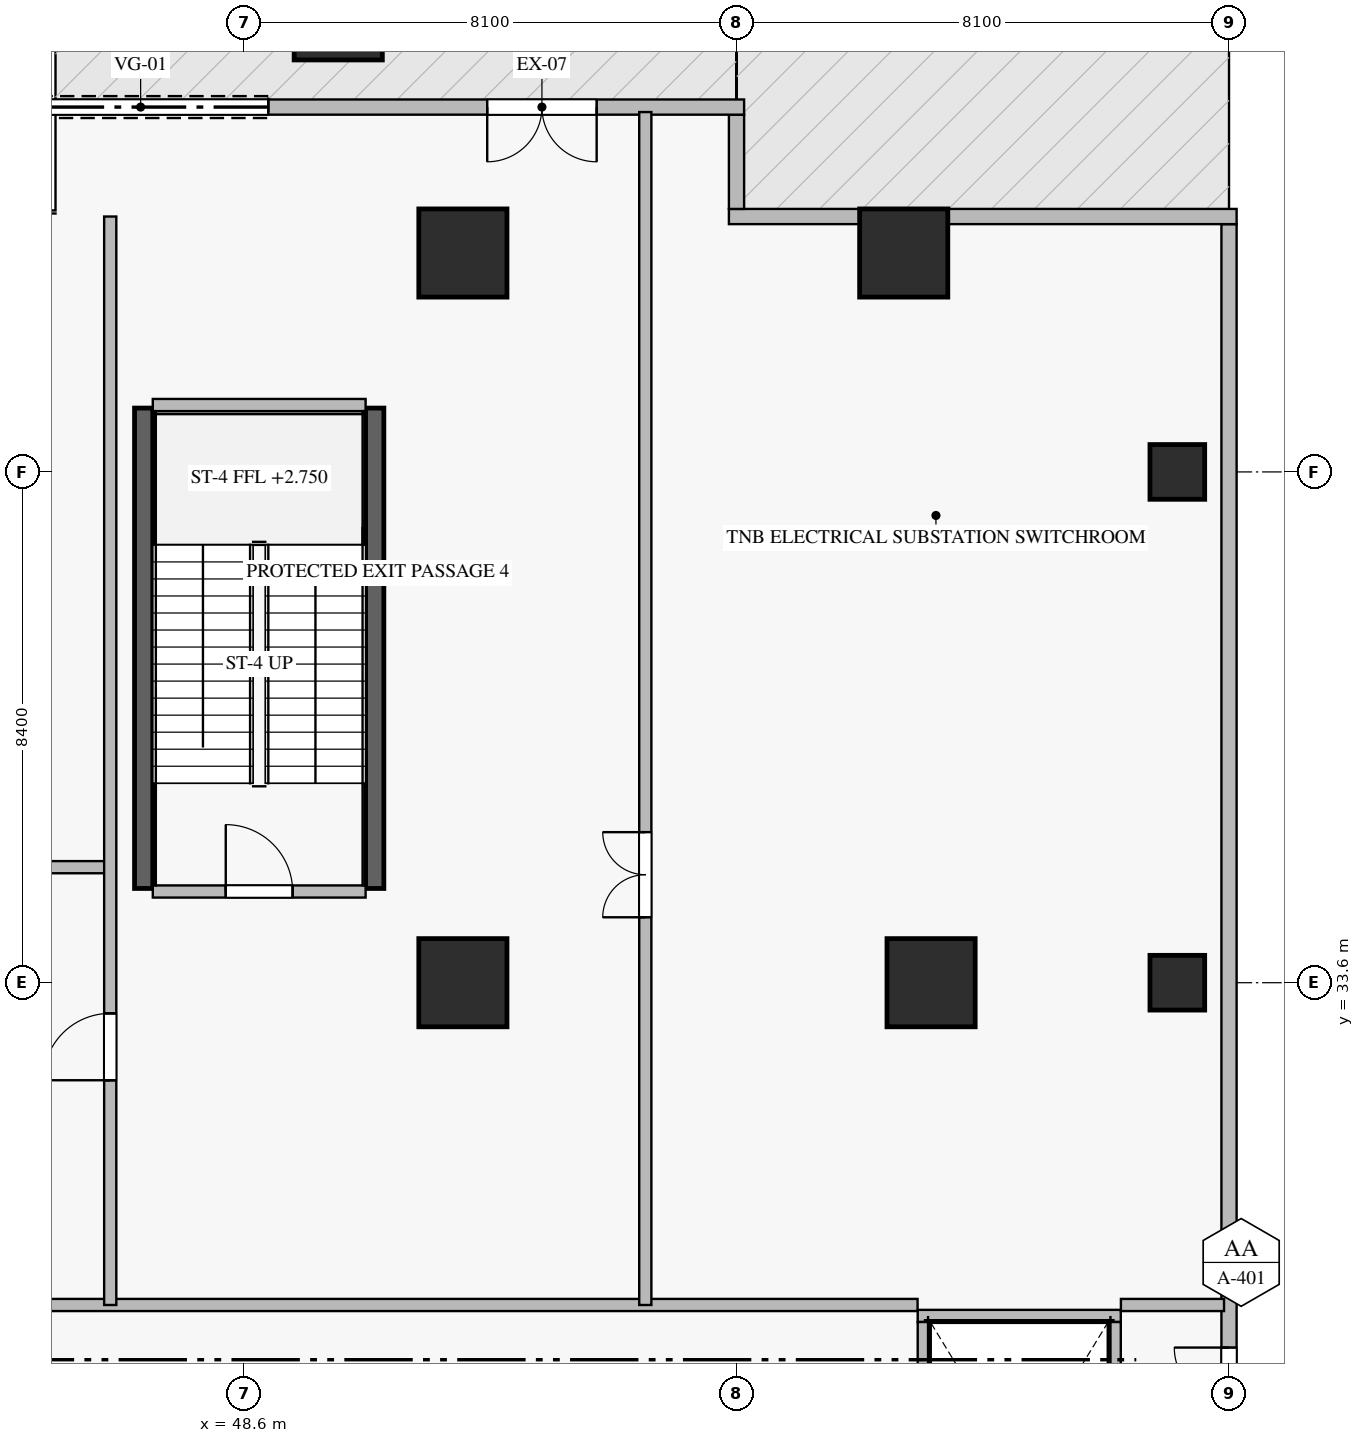
"""IFC4 building model, lengths in metres.
Left out: names, types, materials, properties, quantities, classifications, styles, units other than length and angle.
Written with IfcOpenShell. Run it as: python <this file> out.ifc"""

import sys

from ifc_helpers import new_model, si_unit, direction, frame, frame_2d, origin, origin_2d, place, context, subcontext, project, spatial, rectangle, extrude, source, transform, mapped, element, fill, save


model = new_model("IFC4")
c1 = context("Model", 3, precision=1e-05, world=origin(), true_north=direction((0.0, 1.0)))
c2 = subcontext(c1, "Body", "Model", "MODEL_VIEW")
j1 = project(units=[si_unit("LENGTHUNIT", "METRE"), si_unit("PLANEANGLEUNIT", "RADIAN")], contexts=[c1])
p1 = place(None, origin())
s1 = spatial("IfcSite", under=j1, at=p1, CompositionType="ELEMENT")
p2 = place(p1, origin())
s2 = spatial("IfcBuilding", under=s1, at=p2, CompositionType="ELEMENT")
p3 = place(p2, origin())
s3 = spatial("IfcBuildingStorey", under=s2, at=p3, CompositionType="ELEMENT", Elevation=0.0)
m1 = source(origin(), c2, "Body", "SweptSolid", [
    extrude(rectangle(XDim=0.9, YDim=0.9, at=origin_2d()), origin(), (0.0, 0.0, 1.0), 5.5),
])
for number, where, z_axis, x_axis in (
    (1, (63.95, 33.6, -0.38), (0.0, 0.0, 1.0), (1.0, 0.0, 0.0)),
    (2, (63.95, 42.0, -0.38), (0.0, 0.0, 1.0), (1.0, 0.0, 0.0)),
):
    element("IfcColumn", number, at=place(p3, frame(where, z_axis=z_axis, x_axis=x_axis)), inside=s3, PredefinedType="COLUMN", context=c2, shape_type="MappedRepresentation", body=[
        mapped(m1, transform((0.0, 0.0, 0.0), scale=1.0)),
    ])
m2 = source(origin(), c2, "Body", "SweptSolid", [
    extrude(rectangle(XDim=1.45, YDim=1.45, at=origin_2d()), origin(), (0.0, 0.0, 1.0), 5.5),
])
for number, where, z_axis, x_axis in (
    (3, (52.2, 45.6, -0.38), (0.0, 0.0, 1.0), (1.0, 0.0, 0.0)),
    (4, (52.2, 33.6, -0.38), (0.0, 0.0, 1.0), (1.0, 0.0, 0.0)),
    (5, (50.15, 49.5, -0.38), (0.0, 0.0, 1.0), (1.0, 0.0, 0.0)),
    (6, (59.9, 33.6, -0.38), (0.0, 0.0, 1.0), (1.0, 0.0, 0.0)),
    (7, (59.45, 45.6, -0.38), (0.0, 0.0, 1.0), (1.0, 0.0, 0.0)),
):
    element("IfcColumn", number, at=place(p3, frame(where, z_axis=z_axis, x_axis=x_axis)), inside=s3, PredefinedType="COLUMN", context=c2, shape_type="MappedRepresentation", body=[
        mapped(m2, transform((0.0, 0.0, 0.0), scale=1.0)),
    ])
p4 = place(p3, frame((64.8, 4.325, 0.0), z_axis=(0.0, 0.0, 1.0), x_axis=(0.0, 1.0, 0.0)))
e8 = element("IfcWall", 8, at=p4, inside=s3, PredefinedType="ELEMENTEDWALL", context=c2, shape_type="SweptSolid", body=[
    extrude(rectangle(XDim=41.75, YDim=0.25, at=frame_2d((20.875, 0.0))), origin(), (0.0, 0.0, 1.0), 5.105),
])
p5 = place(p4, frame((21.475, 0.0, 0.0)))
e9 = element("IfcOpeningElement", 9, at=p5, cuts=e8, PredefinedType="OPENING", context=c2, shape_type="SweptSolid", body=[
    extrude(rectangle(XDim=1.8, YDim=2.3, at=frame_2d((0.9, 1.15))), frame((0.0, 0.135, 0.0), z_axis=(0.0, -1.0, 0.0), x_axis=(1.0, 0.0, 0.0)), (0.0, 0.0, 1.0), 0.27),
])
p6 = place(p4, frame((7.275, 0.0, 0.0)))
e10 = element("IfcOpeningElement", 10, at=p6, cuts=e8, PredefinedType="OPENING", context=c2, shape_type="SweptSolid", body=[
    extrude(rectangle(XDim=1.8, YDim=2.3, at=frame_2d((0.9, 1.15))), frame((0.0, 0.135, 0.0), z_axis=(0.0, -1.0, 0.0), x_axis=(1.0, 0.0, 0.0)), (0.0, 0.0, 1.0), 0.27),
])
p7 = place(p3, frame((64.925, 46.2, 0.0), z_axis=(0.0, 0.0, 1.0), x_axis=(-1.0, 0.0, 0.0)))
e11 = element("IfcWall", 11, at=p7, inside=s3, PredefinedType="ELEMENTEDWALL", context=c2, shape_type="SweptSolid", body=[
    extrude(rectangle(XDim=8.35, YDim=0.25, at=frame_2d((4.175, 0.0))), origin(), (0.0, 0.0, 1.0), 5.105),
])
p8 = place(p3, frame((56.7, 46.325, 0.0), z_axis=(0.0, 0.0, 1.0), x_axis=(0.0, 1.0, 0.0)))
e12 = element("IfcWall", 12, at=p8, inside=s3, PredefinedType="ELEMENTEDWALL", context=c2, shape_type="SweptSolid", body=[
    extrude(rectangle(XDim=1.55, YDim=0.25, at=frame_2d((0.775, 0.0))), origin(), (0.0, 0.0, 1.0), 5.105),
])
p9 = place(p3, frame((56.825, 48.0, 0.0), z_axis=(0.0, 0.0, 1.0), x_axis=(-1.0, 0.0, 0.0)))
e13 = element("IfcWall", 13, at=p9, inside=s3, PredefinedType="ELEMENTEDWALL", context=c2, shape_type="SweptSolid", body=[
    extrude(rectangle(XDim=48.85, YDim=0.25, at=frame_2d((24.425, 0.0))), origin(), (0.0, 0.0, 1.0), 5.105),
])
p10 = place(p9, frame((7.825, 0.0, 0.0)))
e14 = element("IfcOpeningElement", 14, at=p10, cuts=e13, PredefinedType="OPENING", context=c2, shape_type="SweptSolid", body=[
    extrude(rectangle(XDim=4.2, YDim=3.1, at=frame_2d((2.1, 1.55))), frame((0.0, 0.135, 0.0), z_axis=(0.0, -1.0, 0.0), x_axis=(1.0, 0.0, 0.0)), (0.0, 0.0, 1.0), 0.27),
])
p11 = place(p9, frame((14.725, 0.0, 0.0)))
e15 = element("IfcOpeningElement", 15, at=p11, cuts=e13, PredefinedType="OPENING", context=c2, shape_type="SweptSolid", body=[
    extrude(rectangle(XDim=3.8, YDim=3.4, at=frame_2d((1.9, 1.7))), frame((0.0, 0.135, 0.0), z_axis=(0.0, -1.0, 0.0), x_axis=(1.0, 0.0, 0.0)), (0.0, 0.0, 1.0), 0.27),
])
p12 = place(p9, frame((38.825, 0.0, 0.0)))
e16 = element("IfcOpeningElement", 16, at=p12, cuts=e13, PredefinedType="OPENING", context=c2, shape_type="SweptSolid", body=[
    extrude(rectangle(XDim=1.8, YDim=2.3, at=frame_2d((0.9, 1.15))), frame((0.0, 0.135, 0.0), z_axis=(0.0, -1.0, 0.0), x_axis=(1.0, 0.0, 0.0)), (0.0, 0.0, 1.0), 0.27),
])
p13 = place(p9, frame((2.425, 0.0, 0.0)))
e17 = element("IfcOpeningElement", 17, at=p13, cuts=e13, PredefinedType="OPENING", context=c2, shape_type="SweptSolid", body=[
    extrude(rectangle(XDim=1.8, YDim=2.3, at=frame_2d((0.9, 1.15))), frame((0.0, 0.135, 0.0), z_axis=(0.0, -1.0, 0.0), x_axis=(1.0, 0.0, 0.0)), (0.0, 0.0, 1.0), 0.27),
])
for number, where, z_axis, x_axis in (
    (18, (46.95, 35.15, -0.38), (0.0, 0.0, 1.0), (0.0, 1.0, 0.0)),
    (19, (50.75, 35.15, -0.38), (0.0, 0.0, 1.0), (0.0, 1.0, 0.0)),
):
    element("IfcWall", number, at=place(p3, frame(where, z_axis=z_axis, x_axis=x_axis)), inside=s3, PredefinedType="SHEAR", context=c2, shape_type="SweptSolid", body=[
        extrude(rectangle(XDim=7.9, YDim=0.3, at=frame_2d((3.95, 0.0))), origin(), (0.0, 0.0, 1.0), 5.498),
    ])
p14 = place(p3, frame((47.1, 35.1, 0.0), z_axis=(0.0, 0.0, 1.0), x_axis=(1.0, 0.0, 0.0)))
e20 = element("IfcWall", 20, at=p14, inside=s3, PredefinedType="STANDARD", context=c2, shape_type="SweptSolid", body=[
    extrude(rectangle(XDim=3.5, YDim=0.2, at=frame_2d((1.75, 0.0))), origin(), (0.0, 0.0, 1.0), 5.12),
])
p15 = place(p14, frame((1.2, 0.0, 0.0)))
e21 = element("IfcOpeningElement", 21, at=p15, cuts=e20, PredefinedType="OPENING", context=c2, shape_type="SweptSolid", body=[
    extrude(rectangle(XDim=1.1, YDim=2.15, at=frame_2d((0.55, 1.075))), frame((0.0, 0.11, 0.0), z_axis=(0.0, -1.0, 0.0), x_axis=(1.0, 0.0, 0.0)), (0.0, 0.0, 1.0), 0.22),
])
p16 = place(p3, frame((47.1, 43.1, 0.0), z_axis=(0.0, 0.0, 1.0), x_axis=(1.0, 0.0, 0.0)))
e22 = element("IfcWall", 22, at=p16, inside=s3, PredefinedType="STANDARD", context=c2, shape_type="SweptSolid", body=[
    extrude(rectangle(XDim=3.5, YDim=0.2, at=frame_2d((1.75, 0.0))), origin(), (0.0, 0.0, 1.0), 2.235),
])
p17 = place(p3, frame((59.68, 28.12, 0.0), z_axis=(0.0, 0.0, 1.0), x_axis=(1.0, 0.0, 0.0)))
e23 = element("IfcWall", 23, at=p17, inside=s3, PredefinedType="STANDARD", context=c2, shape_type="SweptSolid", body=[
    extrude(rectangle(XDim=3.34, YDim=0.2, at=frame_2d((1.67, 0.0))), origin(), (0.0, 0.0, 1.0), 5.12),
])
for number, where, z_axis, x_axis in (
    (24, (59.78, 21.78, 0.0), (0.0, 0.0, 1.0), (0.0, 1.0, 0.0)),
    (25, (62.92, 21.78, 0.0), (0.0, 0.0, 1.0), (0.0, 1.0, 0.0)),
):
    element("IfcWall", number, at=place(p3, frame(where, z_axis=z_axis, x_axis=x_axis)), inside=s3, PredefinedType="STANDARD", context=c2, shape_type="SweptSolid", body=[
        extrude(rectangle(XDim=6.24, YDim=0.2, at=frame_2d((3.12, 0.0))), origin(), (0.0, 0.0, 1.0), 5.12),
    ])
p18 = place(p3, frame((43.3, 28.3, 0.0), z_axis=(0.0, 0.0, 1.0), x_axis=(1.0, 0.0, 0.0)))
e26 = element("IfcWall", 26, at=p18, inside=s3, PredefinedType="STANDARD", context=c2, shape_type="SweptSolid", body=[
    extrude(rectangle(XDim=16.378, YDim=0.2, at=frame_2d((8.189, 0.0))), origin(), (0.0, 0.0, 1.0), 5.12),
])
p19 = place(p3, frame((63.022, 28.3, 0.0), z_axis=(0.0, 0.0, 1.0), x_axis=(1.0, 0.0, 0.0)))
e27 = element("IfcWall", 27, at=p19, inside=s3, PredefinedType="STANDARD", context=c2, shape_type="SweptSolid", body=[
    extrude(rectangle(XDim=1.696, YDim=0.2, at=frame_2d((0.848, 0.0))), origin(), (0.0, 0.0, 1.0), 5.12),
])
p20 = place(p3, frame((43.3, 35.5, 0.0), z_axis=(0.0, 0.0, 1.0), x_axis=(1.0, 0.0, 0.0)))
e28 = element("IfcWall", 28, at=p20, inside=s3, PredefinedType="STANDARD", context=c2, shape_type="SweptSolid", body=[
    extrude(rectangle(XDim=3.1, YDim=0.2, at=frame_2d((1.55, 0.0))), origin(), (0.0, 0.0, 1.0), 5.12),
])
p21 = place(p3, frame((46.4, 28.3, 0.0), z_axis=(0.0, 0.0, 1.0), x_axis=(0.0, 1.0, 0.0)))
e29 = element("IfcWall", 29, at=p21, inside=s3, PredefinedType="STANDARD", context=c2, shape_type="SweptSolid", body=[
    extrude(rectangle(XDim=17.9, YDim=0.2, at=frame_2d((8.95, 0.0))), origin(), (0.0, 0.0, 1.0), 5.12),
])
p22 = place(p21, frame((3.696, 0.0, 0.0)))
e30 = element("IfcOpeningElement", 30, at=p22, cuts=e29, PredefinedType="OPENING", context=c2, shape_type="SweptSolid", body=[
    extrude(rectangle(XDim=1.1, YDim=2.15, at=frame_2d((0.55, 1.075))), frame((0.0, 0.11, 0.0), z_axis=(0.0, -1.0, 0.0), x_axis=(1.0, 0.0, 0.0)), (0.0, 0.0, 1.0), 0.22),
])
p23 = place(p3, frame((55.2, 28.3, 0.0), z_axis=(0.0, 0.0, 1.0), x_axis=(0.0, 1.0, 0.0)))
e31 = element("IfcWall", 31, at=p23, inside=s3, PredefinedType="STANDARD", context=c2, shape_type="SweptSolid", body=[
    extrude(rectangle(XDim=19.618, YDim=0.2, at=frame_2d((9.809, 0.0))), origin(), (0.0, 0.0, 1.0), 5.12),
])
p24 = place(p23, frame((6.376, 0.0, 0.0)))
e32 = element("IfcOpeningElement", 32, at=p24, cuts=e31, PredefinedType="OPENING", context=c2, shape_type="SweptSolid", body=[
    extrude(rectangle(XDim=1.4, YDim=2.2, at=frame_2d((0.7, 1.1))), frame((0.0, 0.11, 0.0), z_axis=(0.0, -1.0, 0.0), x_axis=(1.0, 0.0, 0.0)), (0.0, 0.0, 1.0), 0.22),
])
m3 = source(origin(), c2, "Body", "SweptSolid", [
    extrude(rectangle(XDim=1.8, YDim=2.3, at=frame_2d((0.9, 1.15))), frame((0.0, 0.025, 0.0), z_axis=(0.0, -1.0, 0.0), x_axis=(1.0, 0.0, 0.0)), (0.0, 0.0, 1.0), 0.05),
])
p25 = place(p5, frame((1.8, 0.0, 0.0), z_axis=(0.0, 0.0, 1.0), x_axis=(-1.0, 0.0, 0.0)))
e33 = element("IfcDoor", 33, at=p25, inside=s3, OperationType="DOUBLE_DOOR_SINGLE_SWING", PredefinedType="DOOR", context=c2, shape_type="MappedRepresentation", body=[
    mapped(m3, transform((0.0, 0.0, 0.0), scale=1.0)),
])
fill(e9, e33)
m4 = source(origin(), c2, "Body", "SweptSolid", [
    extrude(rectangle(XDim=4.2, YDim=3.1, at=frame_2d((2.1, 1.55))), frame((0.0, 0.025, 0.0), z_axis=(0.0, -1.0, 0.0), x_axis=(1.0, 0.0, 0.0)), (0.0, 0.0, 1.0), 0.05),
])
p26 = place(p10, origin())
e34 = element("IfcDoor", 34, at=p26, inside=s3, OperationType="ROLLINGUP", PredefinedType="GATE", context=c2, shape_type="MappedRepresentation", body=[
    mapped(m4, transform((0.0, 0.0, 0.0), scale=1.0)),
])
fill(e14, e34)
p27 = place(p13, frame((1.8, 0.0, 0.0), z_axis=(0.0, 0.0, 1.0), x_axis=(-1.0, 0.0, 0.0)))
e35 = element("IfcDoor", 35, at=p27, inside=s3, OperationType="DOUBLE_DOOR_SINGLE_SWING", PredefinedType="DOOR", context=c2, shape_type="MappedRepresentation", body=[
    mapped(m3, transform((0.0, 0.0, 0.0), scale=1.0)),
])
fill(e17, e35)
m5 = source(origin(), c2, "Body", "SweptSolid", [
    extrude(rectangle(XDim=1.1, YDim=2.15, at=frame_2d((0.55, 1.075))), frame((0.0, 0.025, 0.0), z_axis=(0.0, -1.0, 0.0), x_axis=(1.0, 0.0, 0.0)), (0.0, 0.0, 1.0), 0.05),
])
p28 = place(p15, origin())
e36 = element("IfcDoor", 36, at=p28, inside=s3, OperationType="SINGLE_SWING_LEFT", PredefinedType="DOOR", context=c2, shape_type="MappedRepresentation", body=[
    mapped(m5, transform((0.0, 0.0, 0.0), scale=1.0)),
])
fill(e21, e36)
p29 = place(p22, origin())
e37 = element("IfcDoor", 37, at=p29, inside=s3, OperationType="SINGLE_SWING_LEFT", PredefinedType="DOOR", context=c2, shape_type="MappedRepresentation", body=[
    mapped(m5, transform((0.0, 0.0, 0.0), scale=1.0)),
])
fill(e30, e37)
m6 = source(origin(), c2, "Body", "SweptSolid", [
    extrude(rectangle(XDim=1.4, YDim=2.2, at=frame_2d((0.7, 1.1))), frame((0.0, 0.025, 0.0), z_axis=(0.0, -1.0, 0.0), x_axis=(1.0, 0.0, 0.0)), (0.0, 0.0, 1.0), 0.05),
])
p30 = place(p24, origin())
e38 = element("IfcDoor", 38, at=p30, inside=s3, OperationType="DOUBLE_DOOR_SINGLE_SWING", PredefinedType="DOOR", context=c2, shape_type="MappedRepresentation", body=[
    mapped(m6, transform((0.0, 0.0, 0.0), scale=1.0)),
])
fill(e32, e38)
save(model, sys.argv[1])
